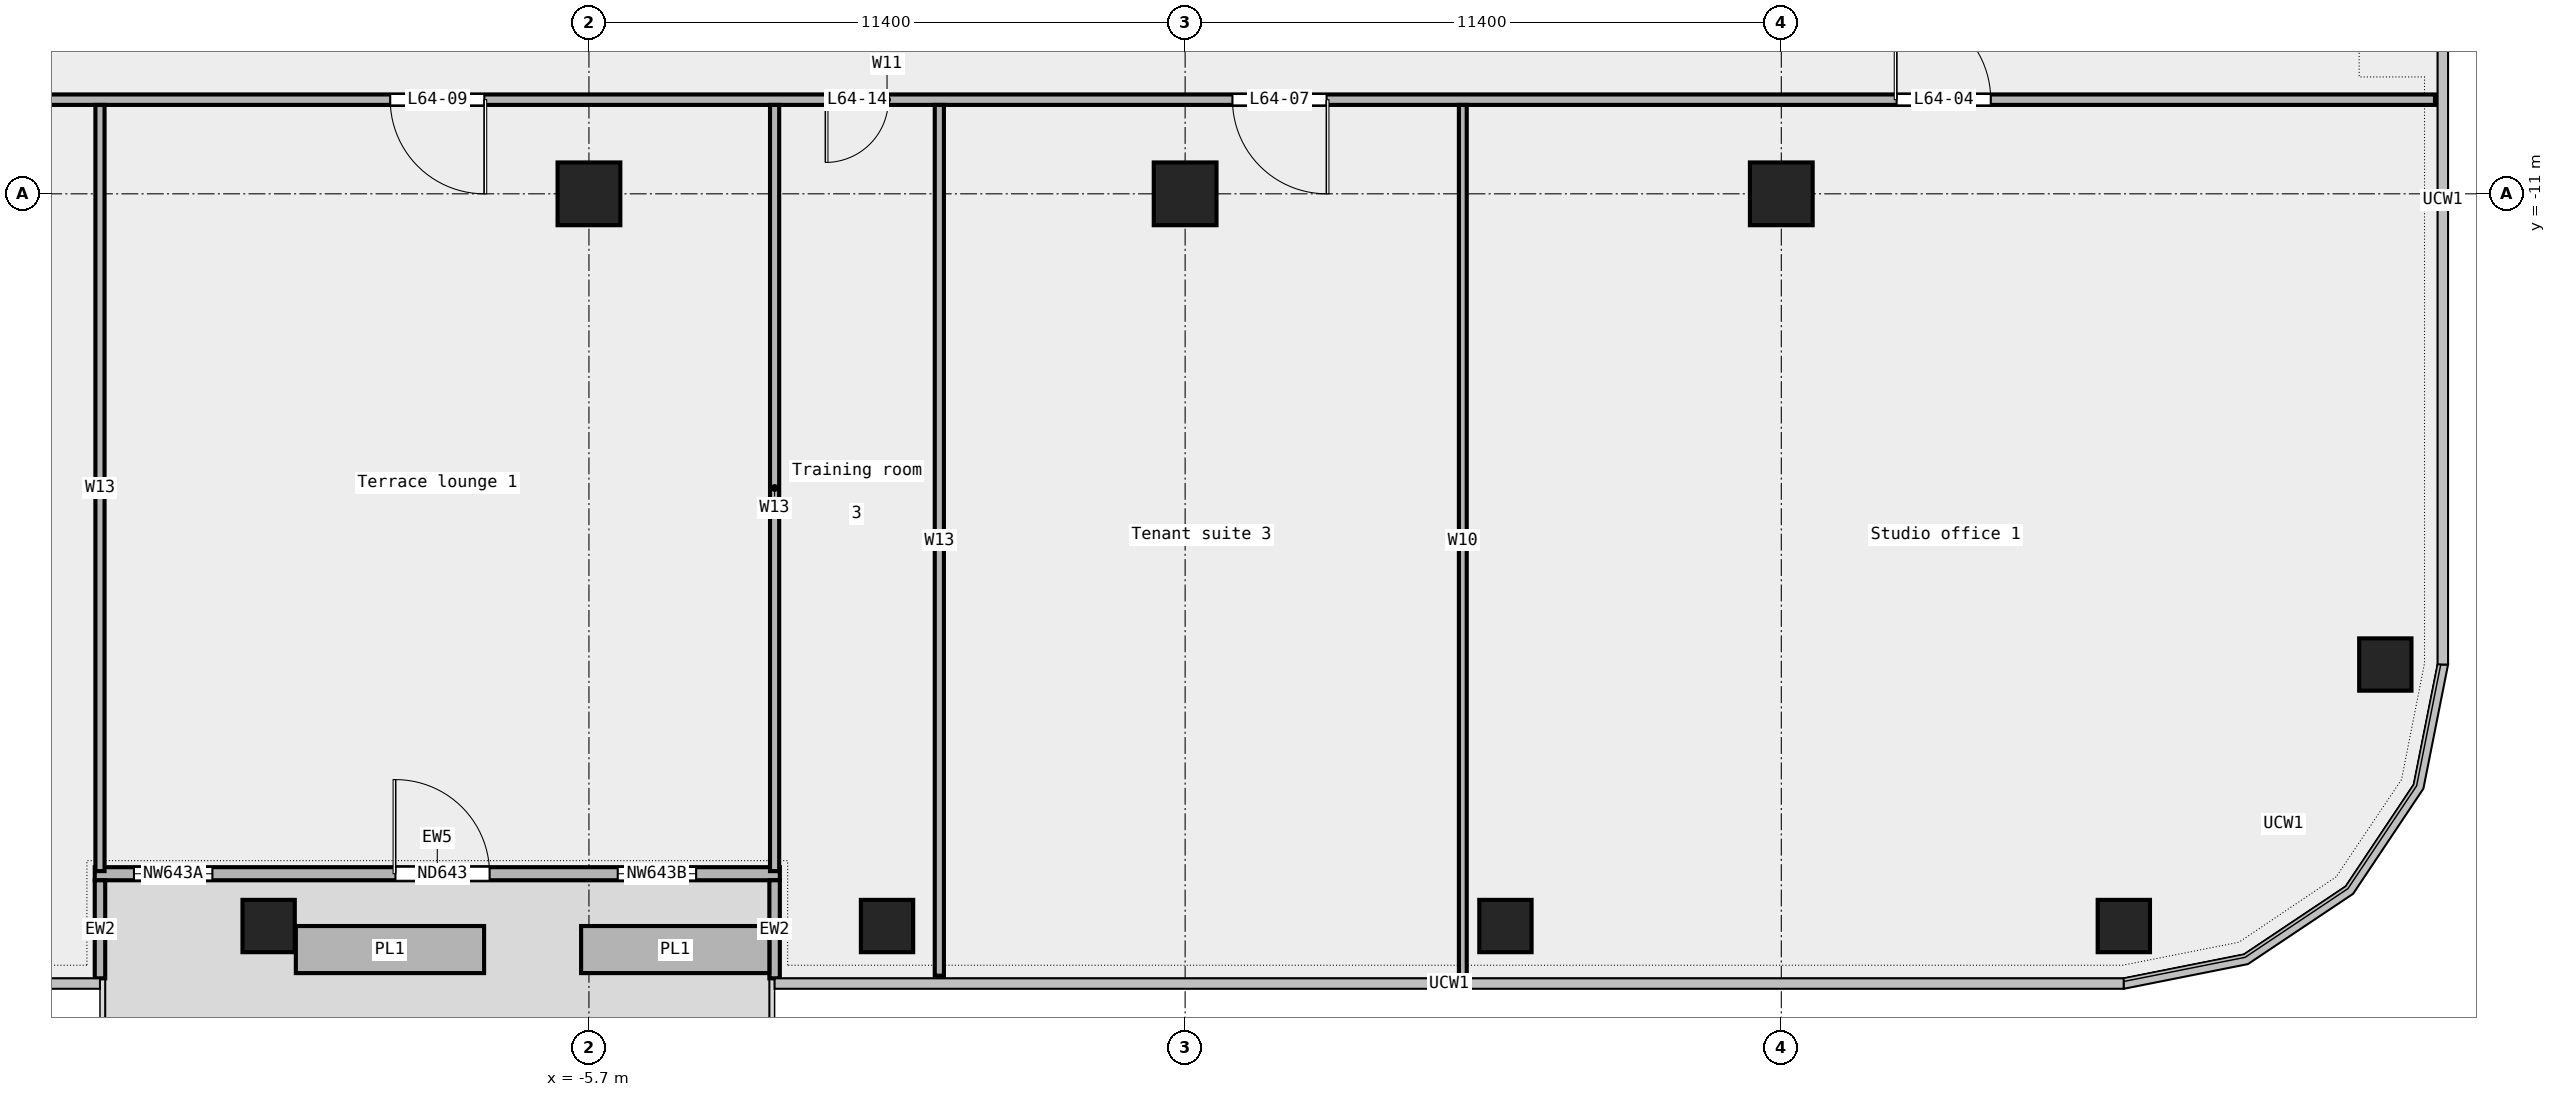
"""IFC4 building model, lengths in metres.
Left out: names, types, materials, properties, quantities, classifications, styles, units other than length and angle.
Written with IfcOpenShell. Run it as: python <this file> out.ifc"""

import sys

from ifc_helpers import new_model, si_unit, direction, frame, frame_2d, origin, origin_2d, place, context, subcontext, project, spatial, rectangle, extrude, element, fill, save


model = new_model("IFC4")
c1 = context("Model", 3, precision=1e-05, world=origin(), true_north=direction((0.0, 1.0)))
c2 = subcontext(c1, "Body", "Model", "MODEL_VIEW")
j1 = project(units=[si_unit("LENGTHUNIT", "METRE"), si_unit("PLANEANGLEUNIT", "RADIAN")], contexts=[c1])
p1 = place(None, origin())
s1 = spatial("IfcSite", under=j1, at=p1, CompositionType="ELEMENT")
p2 = place(p1, origin())
s2 = spatial("IfcBuilding", under=s1, at=p2, CompositionType="ELEMENT")
p3 = place(p2, frame((0.0, 0.0, 295.4)))
s3 = spatial("IfcBuildingStorey", under=s2, at=p3, CompositionType="ELEMENT", Elevation=295.4)
for number, where, z_axis, x_axis in (
    (1, (-11.825, -25.0, 0.0), (0.0, 0.0, 1.0), (1.0, 0.0, 0.0)),
    (2, (0.0, -25.0, 0.0), (0.0, 0.0, 1.0), (1.0, 0.0, 0.0)),
    (3, (11.825, -25.0, 0.0), (0.0, 0.0, 1.0), (1.0, 0.0, 0.0)),
    (4, (23.65, -25.0, 0.0), (0.0, 0.0, 1.0), (1.0, 0.0, 0.0)),
    (5, (28.65, -20.0, 0.0), (0.0, 0.0, 1.0), (1.0, 0.0, 0.0)),
):
    element("IfcColumn", number, at=place(p3, frame(where, z_axis=z_axis, x_axis=x_axis)), inside=s3, PredefinedType="COLUMN", context=c2, shape_type="SweptSolid", body=[
        extrude(rectangle(XDim=1.0, YDim=1.0, at=origin_2d()), origin(), (0.0, 0.0, 1.0), 3.6),
    ])
for number, where, z_axis, x_axis in (
    (6, (-5.7, -11.0, 0.0), (0.0, 0.0, 1.0), (1.0, 0.0, 0.0)),
    (7, (5.7, -11.0, 0.0), (0.0, 0.0, 1.0), (1.0, 0.0, 0.0)),
    (8, (17.1, -11.0, 0.0), (0.0, 0.0, 1.0), (1.0, 0.0, 0.0)),
):
    element("IfcColumn", number, at=place(p3, frame(where, z_axis=z_axis, x_axis=x_axis)), inside=s3, PredefinedType="COLUMN", context=c2, shape_type="SweptSolid", body=[
        extrude(rectangle(XDim=1.2, YDim=1.2, at=origin_2d()), origin(), (0.0, 0.0, 1.0), 3.6),
    ])
p4 = place(p3, frame((-15.15, -24.0, 0.0), z_axis=(0.0, 0.0, 1.0), x_axis=(1.0, 0.0, 0.0)))
e9 = element("IfcWall", 9, at=p4, inside=s3, PredefinedType="STANDARD", context=c2, shape_type="SweptSolid", body=[
    extrude(rectangle(XDim=13.1, YDim=0.25, at=frame_2d((6.55, 0.0))), origin(), (0.0, 0.0, 1.0), 3.6),
])
p5 = place(p4, frame((0.75, 0.0, 0.45)))
e10 = element("IfcOpeningElement", 10, at=p5, cuts=e9, PredefinedType="OPENING", context=c2, shape_type="SweptSolid", body=[
    extrude(rectangle(XDim=1.5, YDim=2.4, at=frame_2d((0.75, 1.2))), frame((0.0, 0.137, 0.0), z_axis=(0.0, -1.0, 0.0), x_axis=(1.0, 0.0, 0.0)), (0.0, 0.0, 1.0), 0.274),
])
p6 = place(p4, frame((5.75, 0.0, 0.0)))
e11 = element("IfcOpeningElement", 11, at=p6, cuts=e9, PredefinedType="OPENING", context=c2, shape_type="SweptSolid", body=[
    extrude(rectangle(XDim=1.8, YDim=2.4, at=frame_2d((0.9, 1.2))), frame((0.0, 0.137, 0.0), z_axis=(0.0, -1.0, 0.0), x_axis=(1.0, 0.0, 0.0)), (0.0, 0.0, 1.0), 0.274),
])
p7 = place(p4, frame((10.0, 0.0, 0.45)))
e12 = element("IfcOpeningElement", 12, at=p7, cuts=e9, PredefinedType="OPENING", context=c2, shape_type="SweptSolid", body=[
    extrude(rectangle(XDim=1.5, YDim=2.4, at=frame_2d((0.75, 1.2))), frame((0.0, 0.137, 0.0), z_axis=(0.0, -1.0, 0.0), x_axis=(1.0, 0.0, 0.0)), (0.0, 0.0, 1.0), 0.274),
])
for number, where, z_axis, x_axis in (
    (13, (-15.05, -26.0, 0.0), (0.0, 0.0, 1.0), (0.0, 1.0, 0.0)),
    (14, (-2.15, -26.0, 0.0), (0.0, 0.0, 1.0), (0.0, 1.0, 0.0)),
):
    element("IfcWall", number, at=place(p3, frame(where, z_axis=z_axis, x_axis=x_axis)), inside=s3, PredefinedType="STANDARD", context=c2, shape_type="SweptSolid", body=[
        extrude(rectangle(XDim=1.875, YDim=0.2, at=frame_2d((0.938, 0.0))), origin(), (0.0, 0.0, 1.0), 3.6),
    ])
for number, where, z_axis, x_axis in (
    (15, (-11.305, -25.45, 0.0), (0.0, 0.0, 1.0), (1.0, 0.0, 0.0)),
    (16, (-5.85, -25.45, 0.0), (0.0, 0.0, 1.0), (1.0, 0.0, 0.0)),
):
    element("IfcWall", number, at=place(p3, frame(where, z_axis=z_axis, x_axis=x_axis)), inside=s3, PredefinedType="STANDARD", context=c2, shape_type="SweptSolid", body=[
        extrude(rectangle(XDim=3.6, YDim=0.9, at=frame_2d((1.8, 0.0))), origin(), (0.0, 0.0, 1.0), 0.7),
    ])
p8 = place(p3, frame((-29.6, -9.2, 0.0), z_axis=(0.0, 0.0, 1.0), x_axis=(1.0, 0.0, 0.0)))
e17 = element("IfcWall", 17, at=p8, inside=s3, PredefinedType="PARTITIONING", context=c2, shape_type="SweptSolid", body=[
    extrude(rectangle(XDim=59.2, YDim=0.2, at=frame_2d((29.6, 0.0))), origin(), (0.0, 0.0, 1.0), 3.6),
])
p9 = place(p8, frame((48.905, 0.0, 0.0)))
e18 = element("IfcOpeningElement", 18, at=p9, cuts=e17, PredefinedType="OPENING", context=c2, shape_type="SweptSolid", body=[
    extrude(rectangle(XDim=1.8, YDim=2.1, at=frame_2d((0.9, 1.05))), frame((0.0, 0.112, 0.0), z_axis=(0.0, -1.0, 0.0), x_axis=(1.0, 0.0, 0.0)), (0.0, 0.0, 1.0), 0.224),
])
p10 = place(p8, frame((36.205, 0.0, 0.0)))
e19 = element("IfcOpeningElement", 19, at=p10, cuts=e17, PredefinedType="OPENING", context=c2, shape_type="SweptSolid", body=[
    extrude(rectangle(XDim=1.8, YDim=2.1, at=frame_2d((0.9, 1.05))), frame((0.0, 0.112, 0.0), z_axis=(0.0, -1.0, 0.0), x_axis=(1.0, 0.0, 0.0)), (0.0, 0.0, 1.0), 0.224),
])
p11 = place(p8, frame((20.1, 0.0, 0.0)))
e20 = element("IfcOpeningElement", 20, at=p11, cuts=e17, PredefinedType="OPENING", context=c2, shape_type="SweptSolid", body=[
    extrude(rectangle(XDim=1.8, YDim=2.1, at=frame_2d((0.9, 1.05))), frame((0.0, 0.112, 0.0), z_axis=(0.0, -1.0, 0.0), x_axis=(1.0, 0.0, 0.0)), (0.0, 0.0, 1.0), 0.224),
])
p12 = place(p8, frame((6.475, 0.0, 0.0)))
e21 = element("IfcOpeningElement", 21, at=p12, cuts=e17, PredefinedType="OPENING", context=c2, shape_type="SweptSolid", body=[
    extrude(rectangle(XDim=1.8, YDim=2.1, at=frame_2d((0.9, 1.05))), frame((0.0, 0.112, 0.0), z_axis=(0.0, -1.0, 0.0), x_axis=(1.0, 0.0, 0.0)), (0.0, 0.0, 1.0), 0.224),
])
p13 = place(p8, frame((28.425, 0.0, 0.0)))
e22 = element("IfcOpeningElement", 22, at=p13, cuts=e17, PredefinedType="OPENING", context=c2, shape_type="SweptSolid", body=[
    extrude(rectangle(XDim=1.2, YDim=2.1, at=frame_2d((0.6, 1.05))), frame((0.0, 0.112, 0.0), z_axis=(0.0, -1.0, 0.0), x_axis=(1.0, 0.0, 0.0)), (0.0, 0.0, 1.0), 0.224),
])
for number, where, z_axis, x_axis in (
    (23, (-15.05, -23.95, 0.0), (0.0, 0.0, 1.0), (0.0, 1.0, 0.0)),
    (24, (-2.15, -23.95, 0.0), (0.0, 0.0, 1.0), (0.0, 1.0, 0.0)),
):
    element("IfcWall", number, at=place(p3, frame(where, z_axis=z_axis, x_axis=x_axis)), inside=s3, PredefinedType="PARTITIONING", context=c2, shape_type="SweptSolid", body=[
        extrude(rectangle(XDim=14.65, YDim=0.175, at=frame_2d((7.325, 0.0))), origin(), (0.0, 0.0, 1.0), 3.6),
    ])
p14 = place(p3, frame((1.0, -25.95, 0.0), z_axis=(0.0, 0.0, 1.0), x_axis=(0.0, 1.0, 0.0)))
e25 = element("IfcWall", 25, at=p14, inside=s3, PredefinedType="PARTITIONING", context=c2, shape_type="SweptSolid", body=[
    extrude(rectangle(XDim=16.65, YDim=0.175, at=frame_2d((8.325, 0.0))), origin(), (0.0, 0.0, 1.0), 3.6),
])
p15 = place(p3, frame((11.01, -25.95, 0.0), z_axis=(0.0, 0.0, 1.0), x_axis=(0.0, 1.0, 0.0)))
e26 = element("IfcWall", 26, at=p15, inside=s3, PredefinedType="PARTITIONING", context=c2, shape_type="SweptSolid", body=[
    extrude(rectangle(XDim=16.65, YDim=0.15, at=frame_2d((8.325, 0.0))), origin(), (0.0, 0.0, 1.0), 3.6),
])
p16 = place(p5, origin())
e27 = element("IfcWindow", 27, at=p16, inside=s3, PartitioningType="SINGLE_PANEL", PredefinedType="WINDOW", context=c2, shape_type="SweptSolid", body=[
    extrude(rectangle(XDim=1.5, YDim=2.4, at=frame_2d((0.75, 1.2))), frame((0.0, 0.03, 0.0), z_axis=(0.0, -1.0, 0.0), x_axis=(1.0, 0.0, 0.0)), (0.0, 0.0, 1.0), 0.06),
])
fill(e10, e27)
p17 = place(p6, origin())
e28 = element("IfcDoor", 28, at=p17, inside=s3, OperationType="DOUBLE_DOOR_SINGLE_SWING", PredefinedType="DOOR", context=c2, shape_type="SweptSolid", body=[
    extrude(rectangle(XDim=1.8, YDim=2.4, at=frame_2d((0.9, 1.2))), frame((0.0, 0.025, 0.0), z_axis=(0.0, -1.0, 0.0), x_axis=(1.0, 0.0, 0.0)), (0.0, 0.0, 1.0), 0.05),
])
fill(e11, e28)
p18 = place(p7, origin())
e29 = element("IfcWindow", 29, at=p18, inside=s3, PartitioningType="SINGLE_PANEL", PredefinedType="WINDOW", context=c2, shape_type="SweptSolid", body=[
    extrude(rectangle(XDim=1.5, YDim=2.4, at=frame_2d((0.75, 1.2))), frame((0.0, 0.03, 0.0), z_axis=(0.0, -1.0, 0.0), x_axis=(1.0, 0.0, 0.0)), (0.0, 0.0, 1.0), 0.06),
])
fill(e12, e29)
p19 = place(p9, origin())
e30 = element("IfcDoor", 30, at=p19, inside=s3, OperationType="DOUBLE_DOOR_SINGLE_SWING", PredefinedType="DOOR", context=c2, shape_type="SweptSolid", body=[
    extrude(rectangle(XDim=1.8, YDim=2.1, at=frame_2d((0.9, 1.05))), frame((0.0, 0.025, 0.0), z_axis=(0.0, -1.0, 0.0), x_axis=(1.0, 0.0, 0.0)), (0.0, 0.0, 1.0), 0.05),
])
fill(e18, e30)
p20 = place(p10, origin())
e31 = element("IfcDoor", 31, at=p20, inside=s3, OperationType="DOUBLE_DOOR_SINGLE_SWING", PredefinedType="DOOR", context=c2, shape_type="SweptSolid", body=[
    extrude(rectangle(XDim=1.8, YDim=2.1, at=frame_2d((0.9, 1.05))), frame((0.0, 0.025, 0.0), z_axis=(0.0, -1.0, 0.0), x_axis=(1.0, 0.0, 0.0)), (0.0, 0.0, 1.0), 0.05),
])
fill(e19, e31)
p21 = place(p11, origin())
e32 = element("IfcDoor", 32, at=p21, inside=s3, OperationType="DOUBLE_DOOR_SINGLE_SWING", PredefinedType="DOOR", context=c2, shape_type="SweptSolid", body=[
    extrude(rectangle(XDim=1.8, YDim=2.1, at=frame_2d((0.9, 1.05))), frame((0.0, 0.025, 0.0), z_axis=(0.0, -1.0, 0.0), x_axis=(1.0, 0.0, 0.0)), (0.0, 0.0, 1.0), 0.05),
])
fill(e20, e32)
p22 = place(p13, origin())
e33 = element("IfcDoor", 33, at=p22, inside=s3, OperationType="SINGLE_SWING_RIGHT", PredefinedType="DOOR", context=c2, shape_type="SweptSolid", body=[
    extrude(rectangle(XDim=1.2, YDim=2.1, at=frame_2d((0.6, 1.05))), frame((0.0, 0.025, 0.0), z_axis=(0.0, -1.0, 0.0), x_axis=(1.0, 0.0, 0.0)), (0.0, 0.0, 1.0), 0.05),
])
fill(e22, e33)
save(model, sys.argv[1])
